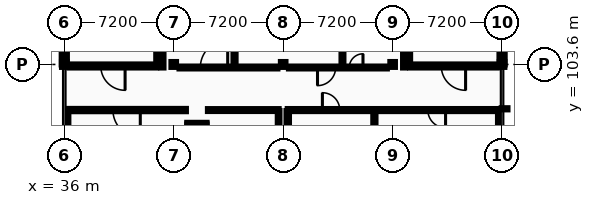
"""IFC4 building model, lengths in metres.
Left out: names, types, materials, properties, quantities, classifications, styles, units other than length and angle.
Written with IfcOpenShell. Run it as: python <this file> out.ifc"""

import sys

from ifc_helpers import new_model, si_unit, direction, frame, frame_2d, origin, origin_2d, place, context, subcontext, project, spatial, rectangle, i_section, extrude, element, fill, save


model = new_model("IFC4")
c1 = context("Model", 3, precision=1e-05, world=origin(), true_north=direction((0.0, 1.0)))
c2 = subcontext(c1, "Body", "Model", "MODEL_VIEW")
j1 = project(units=[si_unit("LENGTHUNIT", "METRE"), si_unit("PLANEANGLEUNIT", "RADIAN")], contexts=[c1])
p1 = place(None, origin())
s1 = spatial("IfcSite", under=j1, at=p1, CompositionType="ELEMENT")
p2 = place(p1, origin())
s2 = spatial("IfcBuilding", under=s1, at=p2, CompositionType="ELEMENT")
p3 = place(p2, frame((0.0, 0.0, 18.4)))
s3 = spatial("IfcBuildingStorey", under=s2, at=p3, CompositionType="ELEMENT", Elevation=18.4)
for number, where, z_axis, x_axis in (
    (1, (36.0, 103.6, 0.0), (0.0, 0.0, 1.0), (1.0, 0.0, 0.0)),
    (2, (43.2, 103.6, 0.0), (0.0, 0.0, 1.0), (1.0, 0.0, 0.0)),
    (3, (50.4, 103.6, 0.0), (0.0, 0.0, 1.0), (1.0, 0.0, 0.0)),
    (4, (57.6, 103.6, 0.0), (0.0, 0.0, 1.0), (1.0, 0.0, 0.0)),
    (5, (64.8, 103.6, 0.0), (0.0, 0.0, 1.0), (1.0, 0.0, 0.0)),
):
    element("IfcColumn", number, at=place(p3, frame(where, z_axis=z_axis, x_axis=x_axis)), inside=s3, PredefinedType="COLUMN", context=c2, shape_type="SweptSolid", body=[
        extrude(i_section(OverallWidth=0.3, OverallDepth=0.32, WebThickness=0.011, FlangeThickness=0.021, FilletRadius=0.027, at=origin_2d()), origin(), (0.0, 0.0, 1.0), 4.4),
    ])
p4 = place(p3, frame((36.0, 106.8, 0.0), z_axis=(0.0, 0.0, 1.0), x_axis=(0.0, -1.0, 0.0)))
e6 = element("IfcWall", 6, at=p4, inside=s3, PredefinedType="STANDARD", context=c2, shape_type="SweptSolid", body=[
    extrude(rectangle(XDim=3.2, YDim=0.34, at=frame_2d((1.6, 0.0))), origin(), (0.0, 0.0, 1.0), 4.215),
])
p5 = place(p4, frame((0.983, 0.0, 0.95)))
e7 = element("IfcOpeningElement", 7, at=p5, cuts=e6, PredefinedType="OPENING", context=c2, shape_type="SweptSolid", body=[
    extrude(rectangle(XDim=1.234, YDim=1.26, at=frame_2d((0.617, 0.63))), frame((0.0, 0.18, 0.0), z_axis=(0.0, -1.0, 0.0), x_axis=(1.0, 0.0, 0.0)), (0.0, 0.0, 1.0), 0.36),
])
p6 = place(p3, frame((64.8, 103.6, 0.0), z_axis=(0.0, 0.0, 1.0), x_axis=(0.0, 1.0, 0.0)))
e8 = element("IfcWall", 8, at=p6, inside=s3, PredefinedType="STANDARD", context=c2, shape_type="SweptSolid", body=[
    extrude(rectangle(XDim=3.2, YDim=0.34, at=frame_2d((1.6, 0.0))), origin(), (0.0, 0.0, 1.0), 4.215),
])
p7 = place(p6, frame((1.17, 0.0, 0.95)))
e9 = element("IfcOpeningElement", 9, at=p7, cuts=e8, PredefinedType="OPENING", context=c2, shape_type="SweptSolid", body=[
    extrude(rectangle(XDim=0.86, YDim=1.296, at=frame_2d((0.43, 0.648))), frame((0.0, 0.18, 0.0), z_axis=(0.0, -1.0, 0.0), x_axis=(1.0, 0.0, 0.0)), (0.0, 0.0, 1.0), 0.36),
])
p8 = place(p3, frame((36.35, 103.5, 0.0), z_axis=(0.0, 0.0, 1.0), x_axis=(1.0, 0.0, 0.0)))
e10 = element("IfcWall", 10, at=p8, inside=s3, PredefinedType="PARTITIONING", context=c2, shape_type="SweptSolid", body=[
    extrude(rectangle(XDim=5.7, YDim=0.2, at=frame_2d((2.85, 0.0))), origin(), (0.0, 0.0, 1.0), 3.95),
])
p9 = place(p8, frame((2.05, 0.0, 0.0)))
e11 = element("IfcOpeningElement", 11, at=p9, cuts=e10, PredefinedType="OPENING", context=c2, shape_type="SweptSolid", body=[
    extrude(rectangle(XDim=1.6, YDim=2.2, at=frame_2d((0.8, 1.1))), frame((0.0, 0.11, 0.0), z_axis=(0.0, -1.0, 0.0), x_axis=(1.0, 0.0, 0.0)), (0.0, 0.0, 1.0), 0.22),
])
p10 = place(p3, frame((42.15, 103.6, 0.0), z_axis=(0.0, 0.0, 1.0), x_axis=(0.0, 1.0, 0.0)))
e12 = element("IfcWall", 12, at=p10, inside=s3, PredefinedType="PARTITIONING", context=c2, shape_type="SweptSolid", body=[
    extrude(rectangle(XDim=3.2, YDim=0.2, at=frame_2d((1.6, 0.0))), origin(), (0.0, 0.0, 1.0), 4.215),
])
p11 = place(p3, frame((58.75, 103.5, 0.0), z_axis=(0.0, 0.0, 1.0), x_axis=(1.0, 0.0, 0.0)))
e13 = element("IfcWall", 13, at=p11, inside=s3, PredefinedType="PARTITIONING", context=c2, shape_type="SweptSolid", body=[
    extrude(rectangle(XDim=5.7, YDim=0.2, at=frame_2d((2.85, 0.0))), origin(), (0.0, 0.0, 1.0), 3.95),
])
p12 = place(p11, frame((2.05, 0.0, 0.0)))
e14 = element("IfcOpeningElement", 14, at=p12, cuts=e13, PredefinedType="OPENING", context=c2, shape_type="SweptSolid", body=[
    extrude(rectangle(XDim=1.6, YDim=2.2, at=frame_2d((0.8, 1.1))), frame((0.0, 0.11, 0.0), z_axis=(0.0, -1.0, 0.0), x_axis=(1.0, 0.0, 0.0)), (0.0, 0.0, 1.0), 0.22),
])
p13 = place(p3, frame((58.65, 103.6, 0.0), z_axis=(0.0, 0.0, 1.0), x_axis=(0.0, 1.0, 0.0)))
e15 = element("IfcWall", 15, at=p13, inside=s3, PredefinedType="PARTITIONING", context=c2, shape_type="SweptSolid", body=[
    extrude(rectangle(XDim=3.2, YDim=0.2, at=frame_2d((1.6, 0.0))), origin(), (0.0, 0.0, 1.0), 4.215),
])
p14 = place(p3, frame((44.09, 99.705, 0.0), z_axis=(0.0, 0.0, 1.0), x_axis=(1.0, 0.0, 0.0)))
e16 = element("IfcWall", 16, at=p14, inside=s3, PredefinedType="PARTITIONING", context=c2, shape_type="SweptSolid", body=[
    extrude(rectangle(XDim=1.27, YDim=0.11, at=frame_2d((0.635, 0.0))), origin(), (0.0, 0.0, 1.0), 4.215),
])
for number, where, z_axis, x_axis in (
    (17, (44.145, 98.6, 0.0), (0.0, 0.0, 1.0), (0.0, 1.0, 0.0)),
    (18, (45.305, 98.6, 0.0), (0.0, 0.0, 1.0), (0.0, 1.0, 0.0)),
):
    element("IfcWall", number, at=place(p3, frame(where, z_axis=z_axis, x_axis=x_axis)), inside=s3, PredefinedType="PARTITIONING", context=c2, shape_type="SweptSolid", body=[
        extrude(rectangle(XDim=1.05, YDim=0.11, at=frame_2d((0.525, 0.0))), origin(), (0.0, 0.0, 1.0), 4.215),
    ])
p15 = place(p3, frame((36.2, 100.6, 0.0), z_axis=(0.0, 0.0, 1.0), x_axis=(1.0, 0.0, 0.0)))
e19 = element("IfcWall", 19, at=p15, inside=s3, PredefinedType="PARTITIONING", context=c2, shape_type="SweptSolid", body=[
    extrude(rectangle(XDim=7.8, YDim=0.15, at=frame_2d((3.9, 0.0))), origin(), (0.0, 0.0, 1.0), 4.215),
])
p16 = place(p15, frame((3.0, 0.0, 0.0)))
e20 = element("IfcOpeningElement", 20, at=p16, cuts=e19, PredefinedType="OPENING", context=c2, shape_type="SweptSolid", body=[
    extrude(rectangle(XDim=1.8, YDim=2.3, at=frame_2d((0.9, 1.15))), frame((0.0, 0.085, 0.0), z_axis=(0.0, -1.0, 0.0), x_axis=(1.0, 0.0, 0.0)), (0.0, 0.0, 1.0), 0.17),
])
p17 = place(p3, frame((45.45, 100.6, 0.0), z_axis=(0.0, 0.0, 1.0), x_axis=(1.0, 0.0, 0.0)))
e21 = element("IfcWall", 21, at=p17, inside=s3, PredefinedType="PARTITIONING", context=c2, shape_type="SweptSolid", body=[
    extrude(rectangle(XDim=4.65, YDim=0.125, at=frame_2d((2.325, 0.0))), origin(), (0.0, 0.0, 1.0), 4.215),
])
p18 = place(p17, frame((0.45, 0.0, 0.0)))
e22 = element("IfcOpeningElement", 22, at=p18, cuts=e21, PredefinedType="OPENING", context=c2, shape_type="SweptSolid", body=[
    extrude(rectangle(XDim=1.0, YDim=2.1, at=frame_2d((0.5, 1.05))), frame((0.0, 0.073, 0.0), z_axis=(0.0, -1.0, 0.0), x_axis=(1.0, 0.0, 0.0)), (0.0, 0.0, 1.0), 0.145),
])
p19 = place(p3, frame((50.7, 100.6, 0.0), z_axis=(0.0, 0.0, 1.0), x_axis=(1.0, 0.0, 0.0)))
e23 = element("IfcWall", 23, at=p19, inside=s3, PredefinedType="PARTITIONING", context=c2, shape_type="SweptSolid", body=[
    extrude(rectangle(XDim=13.9, YDim=0.135, at=frame_2d((6.95, 0.0))), origin(), (0.0, 0.0, 1.0), 4.215),
])
p20 = place(p19, frame((2.28, 0.0, 0.0)))
e24 = element("IfcOpeningElement", 24, at=p20, cuts=e23, PredefinedType="OPENING", context=c2, shape_type="SweptSolid", body=[
    extrude(rectangle(XDim=1.14, YDim=2.068, at=frame_2d((0.57, 1.034))), frame((0.0, 0.078, 0.0), z_axis=(0.0, -1.0, 0.0), x_axis=(1.0, 0.0, 0.0)), (0.0, 0.0, 1.0), 0.155),
])
p21 = place(p19, frame((9.217, 0.0, 0.0)))
e25 = element("IfcOpeningElement", 25, at=p21, cuts=e23, PredefinedType="OPENING", context=c2, shape_type="SweptSolid", body=[
    extrude(rectangle(XDim=1.166, YDim=2.068, at=frame_2d((0.583, 1.034))), frame((0.0, 0.078, 0.0), z_axis=(0.0, -1.0, 0.0), x_axis=(1.0, 0.0, 0.0)), (0.0, 0.0, 1.0), 0.155),
])
p22 = place(p3, frame((43.58, 103.4, 0.0), z_axis=(0.0, 0.0, 1.0), x_axis=(1.0, 0.0, 0.0)))
e26 = element("IfcWall", 26, at=p22, inside=s3, PredefinedType="PARTITIONING", context=c2, shape_type="SweptSolid", body=[
    extrude(rectangle(XDim=6.44, YDim=0.125, at=frame_2d((3.22, 0.0))), origin(), (0.0, 0.0, 1.0), 3.95),
])
p23 = place(p22, frame((1.37, 0.0, 0.0)))
e27 = element("IfcOpeningElement", 27, at=p23, cuts=e26, PredefinedType="OPENING", context=c2, shape_type="SweptSolid", body=[
    extrude(rectangle(XDim=1.8, YDim=2.3, at=frame_2d((0.9, 1.15))), frame((0.0, 0.073, 0.0), z_axis=(0.0, -1.0, 0.0), x_axis=(1.0, 0.0, 0.0)), (0.0, 0.0, 1.0), 0.145),
])
p24 = place(p3, frame((50.78, 103.4, 0.0), z_axis=(0.0, 0.0, 1.0), x_axis=(1.0, 0.0, 0.0)))
e28 = element("IfcWall", 28, at=p24, inside=s3, PredefinedType="PARTITIONING", context=c2, shape_type="SweptSolid", body=[
    extrude(rectangle(XDim=6.44, YDim=0.125, at=frame_2d((3.22, 0.0))), origin(), (0.0, 0.0, 1.0), 3.95),
])
p25 = place(p24, frame((3.97, 0.0, 0.0)))
e29 = element("IfcOpeningElement", 29, at=p25, cuts=e28, PredefinedType="OPENING", context=c2, shape_type="SweptSolid", body=[
    extrude(rectangle(XDim=0.9, YDim=2.1, at=frame_2d((0.45, 1.05))), frame((0.0, 0.073, 0.0), z_axis=(0.0, -1.0, 0.0), x_axis=(1.0, 0.0, 0.0)), (0.0, 0.0, 1.0), 0.145),
])
p26 = place(p24, frame((1.878, 0.0, 0.0)))
e30 = element("IfcOpeningElement", 30, at=p26, cuts=e28, PredefinedType="OPENING", context=c2, shape_type="SweptSolid", body=[
    extrude(rectangle(XDim=1.192, YDim=2.068, at=frame_2d((0.596, 1.034))), frame((0.0, 0.073, 0.0), z_axis=(0.0, -1.0, 0.0), x_axis=(1.0, 0.0, 0.0)), (0.0, 0.0, 1.0), 0.145),
])
p27 = place(p3, frame((36.2, 96.78, 0.0), z_axis=(0.0, 0.0, 1.0), x_axis=(0.0, 1.0, 0.0)))
e31 = element("IfcWall", 31, at=p27, inside=s3, PredefinedType="PARTITIONING", context=c2, shape_type="SweptSolid", body=[
    extrude(rectangle(XDim=3.745, YDim=0.135, at=frame_2d((1.873, 0.0))), origin(), (0.0, 0.0, 1.0), 3.9),
])
p28 = place(p3, frame((42.45, 103.4, 0.0), z_axis=(0.0, 0.0, 1.0), x_axis=(0.0, 1.0, 0.0)))
e32 = element("IfcWall", 32, at=p28, inside=s3, PredefinedType="PARTITIONING", context=c2, shape_type="SweptSolid", body=[
    extrude(rectangle(XDim=3.225, YDim=0.15, at=frame_2d((1.613, 0.0))), origin(), (0.0, 0.0, 1.0), 4.215),
])
p29 = place(p3, frame((47.2, 103.462, 0.0), z_axis=(0.0, 0.0, 1.0), x_axis=(0.0, 1.0, 0.0)))
e33 = element("IfcWall", 33, at=p29, inside=s3, PredefinedType="PARTITIONING", context=c2, shape_type="SweptSolid", body=[
    extrude(rectangle(XDim=14.338, YDim=0.135, at=frame_2d((7.169, 0.0))), origin(), (0.0, 0.0, 1.0), 4.215),
])
p30 = place(p3, frame((50.1, 96.78, 0.0), z_axis=(0.0, 0.0, 1.0), x_axis=(0.0, 1.0, 0.0)))
e34 = element("IfcWall", 34, at=p30, inside=s3, PredefinedType="PARTITIONING", context=c2, shape_type="SweptSolid", body=[
    extrude(rectangle(XDim=3.758, YDim=0.11, at=frame_2d((1.879, 0.0))), origin(), (0.0, 0.0, 1.0), 4.215),
])
p31 = place(p3, frame((50.7, 96.78, 0.0), z_axis=(0.0, 0.0, 1.0), x_axis=(0.0, 1.0, 0.0)))
e35 = element("IfcWall", 35, at=p31, inside=s3, PredefinedType="PARTITIONING", context=c2, shape_type="SweptSolid", body=[
    extrude(rectangle(XDim=3.752, YDim=0.16, at=frame_2d((1.876, 0.0))), origin(), (0.0, 0.0, 1.0), 3.91),
])
p32 = place(p3, frame((54.3, 103.462, 0.0), z_axis=(0.0, 0.0, 1.0), x_axis=(0.0, 1.0, 0.0)))
e36 = element("IfcWall", 36, at=p32, inside=s3, PredefinedType="PARTITIONING", context=c2, shape_type="SweptSolid", body=[
    extrude(rectangle(XDim=14.338, YDim=0.125, at=frame_2d((7.169, 0.0))), origin(), (0.0, 0.0, 1.0), 4.215),
])
p33 = place(p3, frame((56.4, 89.468, 0.0), z_axis=(0.0, 0.0, 1.0), x_axis=(0.0, 1.0, 0.0)))
e37 = element("IfcWall", 37, at=p33, inside=s3, PredefinedType="PARTITIONING", context=c2, shape_type="SweptSolid", body=[
    extrude(rectangle(XDim=11.065, YDim=0.142, at=frame_2d((5.532, 0.0))), origin(), (0.0, 0.0, 1.0), 4.215),
])
p34 = place(p3, frame((58.35, 103.4, 0.0), z_axis=(0.0, 0.0, 1.0), x_axis=(0.0, 1.0, 0.0)))
e38 = element("IfcWall", 38, at=p34, inside=s3, PredefinedType="PARTITIONING", context=c2, shape_type="SweptSolid", body=[
    extrude(rectangle(XDim=3.225, YDim=0.125, at=frame_2d((1.613, 0.0))), origin(), (0.0, 0.0, 1.0), 4.215),
])
p35 = place(p3, frame((64.6, 96.78, 0.0), z_axis=(0.0, 0.0, 1.0), x_axis=(0.0, 1.0, 0.0)))
e39 = element("IfcWall", 39, at=p35, inside=s3, PredefinedType="PARTITIONING", context=c2, shape_type="SweptSolid", body=[
    extrude(rectangle(XDim=3.752, YDim=0.135, at=frame_2d((1.876, 0.0))), origin(), (0.0, 0.0, 1.0), 3.9),
])
p36 = place(p9, origin())
e40 = element("IfcDoor", 40, at=p36, inside=s3, OperationType="DOUBLE_DOOR_SINGLE_SWING", PredefinedType="DOOR", context=c2, shape_type="SweptSolid", body=[
    extrude(rectangle(XDim=1.6, YDim=2.2, at=frame_2d((0.8, 1.1))), frame((0.0, 0.025, 0.0), z_axis=(0.0, -1.0, 0.0), x_axis=(1.0, 0.0, 0.0)), (0.0, 0.0, 1.0), 0.05),
])
fill(e11, e40)
p37 = place(p12, origin())
e41 = element("IfcDoor", 41, at=p37, inside=s3, OperationType="DOUBLE_DOOR_SINGLE_SWING", PredefinedType="DOOR", context=c2, shape_type="SweptSolid", body=[
    extrude(rectangle(XDim=1.6, YDim=2.2, at=frame_2d((0.8, 1.1))), frame((0.0, 0.025, 0.0), z_axis=(0.0, -1.0, 0.0), x_axis=(1.0, 0.0, 0.0)), (0.0, 0.0, 1.0), 0.05),
])
fill(e14, e41)
p38 = place(p18, origin())
e42 = element("IfcDoor", 42, at=p38, inside=s3, OperationType="SLIDING_TO_LEFT", PredefinedType="DOOR", context=c2, shape_type="SweptSolid", body=[
    extrude(rectangle(XDim=1.0, YDim=2.1, at=frame_2d((0.5, 1.05))), frame((0.0, 0.025, 0.0), z_axis=(0.0, -1.0, 0.0), x_axis=(1.0, 0.0, 0.0)), (0.0, 0.0, 1.0), 0.05),
])
fill(e22, e42)
p39 = place(p25, frame((0.9, 0.0, 0.0), z_axis=(0.0, 0.0, 1.0), x_axis=(-1.0, 0.0, 0.0)))
e43 = element("IfcDoor", 43, at=p39, inside=s3, OperationType="SINGLE_SWING_RIGHT", PredefinedType="DOOR", context=c2, shape_type="SweptSolid", body=[
    extrude(rectangle(XDim=0.9, YDim=2.1, at=frame_2d((0.45, 1.05))), frame((0.0, 0.025, 0.0), z_axis=(0.0, -1.0, 0.0), x_axis=(1.0, 0.0, 0.0)), (0.0, 0.0, 1.0), 0.05),
])
fill(e29, e43)
p40 = place(p20, origin())
e44 = element("IfcDoor", 44, at=p40, inside=s3, OperationType="SINGLE_SWING_LEFT", PredefinedType="DOOR", context=c2, shape_type="SweptSolid", body=[
    extrude(rectangle(XDim=1.14, YDim=2.068, at=frame_2d((0.57, 1.034))), frame((0.0, 0.025, 0.0), z_axis=(0.0, -1.0, 0.0), x_axis=(1.0, 0.0, 0.0)), (0.0, 0.0, 1.0), 0.05),
])
fill(e24, e44)
p41 = place(p23, frame((1.8, 0.0, 0.0), z_axis=(0.0, 0.0, 1.0), x_axis=(-1.0, 0.0, 0.0)))
e45 = element("IfcDoor", 45, at=p41, inside=s3, OperationType="DOUBLE_DOOR_SINGLE_SWING", PredefinedType="DOOR", context=c2, shape_type="SweptSolid", body=[
    extrude(rectangle(XDim=1.8, YDim=2.3, at=frame_2d((0.9, 1.15))), frame((0.0, 0.025, 0.0), z_axis=(0.0, -1.0, 0.0), x_axis=(1.0, 0.0, 0.0)), (0.0, 0.0, 1.0), 0.05),
])
fill(e27, e45)
p42 = place(p16, origin())
e46 = element("IfcDoor", 46, at=p42, inside=s3, OperationType="DOUBLE_DOOR_SINGLE_SWING", PredefinedType="DOOR", context=c2, shape_type="SweptSolid", body=[
    extrude(rectangle(XDim=1.8, YDim=2.3, at=frame_2d((0.9, 1.15))), frame((0.0, 0.025, 0.0), z_axis=(0.0, -1.0, 0.0), x_axis=(1.0, 0.0, 0.0)), (0.0, 0.0, 1.0), 0.05),
])
fill(e20, e46)
p43 = place(p21, origin())
e47 = element("IfcDoor", 47, at=p43, inside=s3, OperationType="SINGLE_SWING_RIGHT", PredefinedType="DOOR", context=c2, shape_type="SweptSolid", body=[
    extrude(rectangle(XDim=1.166, YDim=2.068, at=frame_2d((0.583, 1.034))), frame((0.0, 0.025, 0.0), z_axis=(0.0, -1.0, 0.0), x_axis=(1.0, 0.0, 0.0)), (0.0, 0.0, 1.0), 0.05),
])
fill(e25, e47)
p44 = place(p26, frame((1.192, 0.0, 0.0), z_axis=(0.0, 0.0, 1.0), x_axis=(-1.0, 0.0, 0.0)))
e48 = element("IfcDoor", 48, at=p44, inside=s3, OperationType="SINGLE_SWING_LEFT", PredefinedType="DOOR", context=c2, shape_type="SweptSolid", body=[
    extrude(rectangle(XDim=1.192, YDim=2.068, at=frame_2d((0.596, 1.034))), frame((0.0, 0.025, 0.0), z_axis=(0.0, -1.0, 0.0), x_axis=(1.0, 0.0, 0.0)), (0.0, 0.0, 1.0), 0.05),
])
fill(e30, e48)
save(model, sys.argv[1])
